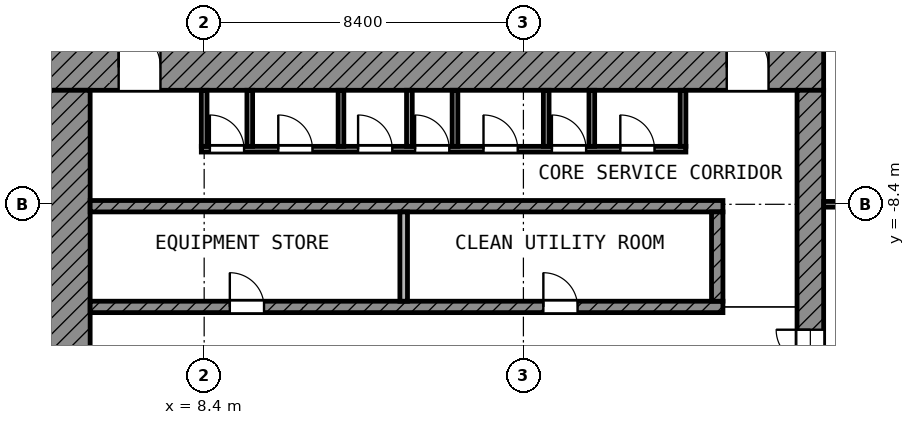
"""IFC4 building model, lengths in metres.
Left out: names, types, materials, properties, quantities, classifications, styles, units other than length and angle.
Written with IfcOpenShell. Run it as: python <this file> out.ifc"""

import sys

from ifc_helpers import new_model, si_unit, direction, frame, frame_2d, origin, place, context, subcontext, project, spatial, rectangle, extrude, element, fill, save


model = new_model("IFC4")
c1 = context("Model", 3, precision=1e-05, world=origin(), true_north=direction((0.0, 1.0)))
c2 = subcontext(c1, "Body", "Model", "MODEL_VIEW")
j1 = project(units=[si_unit("LENGTHUNIT", "METRE"), si_unit("PLANEANGLEUNIT", "RADIAN")], contexts=[c1])
p1 = place(None, origin())
s1 = spatial("IfcSite", under=j1, at=p1, CompositionType="ELEMENT")
p2 = place(p1, origin())
s2 = spatial("IfcBuilding", under=s1, at=p2, CompositionType="ELEMENT")
p3 = place(p2, frame((0.0, 0.0, 302.8)))
s3 = spatial("IfcBuildingStorey", under=s2, at=p3, CompositionType="ELEMENT", Elevation=302.8)
p4 = place(p3, frame((4.2, -4.8, 0.0), z_axis=(0.0, 0.0, 1.0), x_axis=(1.0, 0.0, 0.0)))
e1 = element("IfcWall", 1, at=p4, inside=s3, PredefinedType="SHEAR", context=c2, shape_type="SweptSolid", body=[
    extrude(rectangle(XDim=20.5, YDim=1.2, at=frame_2d((10.25, 0.0))), origin(), (0.0, 0.0, 1.0), 3.6),
])
p5 = place(p4, frame((1.95, 0.0, 0.0)))
e2 = element("IfcOpeningElement", 2, at=p5, cuts=e1, PredefinedType="OPENING", context=c2, shape_type="SweptSolid", body=[
    extrude(rectangle(XDim=1.1, YDim=2.1, at=frame_2d((0.55, 1.05))), frame((0.0, 0.61, 0.0), z_axis=(0.0, -1.0, 0.0), x_axis=(1.0, 0.0, 0.0)), (0.0, 0.0, 1.0), 1.22),
])
p6 = place(p4, frame((17.95, 0.0, 0.0)))
e3 = element("IfcOpeningElement", 3, at=p6, cuts=e1, PredefinedType="OPENING", context=c2, shape_type="SweptSolid", body=[
    extrude(rectangle(XDim=1.1, YDim=2.1, at=frame_2d((0.55, 1.05))), frame((0.0, 0.61, 0.0), z_axis=(0.0, -1.0, 0.0), x_axis=(1.0, 0.0, 0.0)), (0.0, 0.0, 1.0), 1.22),
])
p7 = place(p3, frame((4.8, -24.7, 0.0), z_axis=(0.0, 0.0, 1.0), x_axis=(0.0, 1.0, 0.0)))
e4 = element("IfcWall", 4, at=p7, inside=s3, PredefinedType="SHEAR", context=c2, shape_type="SweptSolid", body=[
    extrude(rectangle(XDim=19.3, YDim=1.2, at=frame_2d((9.65, 0.0))), origin(), (0.0, 0.0, 1.0), 3.6),
])
p8 = place(p7, frame((11.15, 0.0, 0.0)))
e5 = element("IfcOpeningElement", 5, at=p8, cuts=e4, PredefinedType="OPENING", context=c2, shape_type="SweptSolid", body=[
    extrude(rectangle(XDim=1.1, YDim=2.1, at=frame_2d((0.55, 1.05))), frame((0.0, 0.61, 0.0), z_axis=(0.0, -1.0, 0.0), x_axis=(1.0, 0.0, 0.0)), (0.0, 0.0, 1.0), 1.22),
])
p9 = place(p7, frame((1.85, 0.0, 0.0)))
e6 = element("IfcOpeningElement", 6, at=p9, cuts=e4, PredefinedType="OPENING", context=c2, shape_type="SweptSolid", body=[
    extrude(rectangle(XDim=1.1, YDim=2.1, at=frame_2d((0.55, 1.05))), frame((0.0, 0.61, 0.0), z_axis=(0.0, -1.0, 0.0), x_axis=(1.0, 0.0, 0.0)), (0.0, 0.0, 1.0), 1.22),
])
p10 = place(p3, frame((24.35, -24.0, 0.0), z_axis=(0.0, 0.0, 1.0), x_axis=(0.0, 1.0, 0.0)))
e7 = element("IfcWall", 7, at=p10, inside=s3, PredefinedType="SHEAR", context=c2, shape_type="SweptSolid", body=[
    extrude(rectangle(XDim=18.6, YDim=0.7, at=frame_2d((9.3, 0.0))), origin(), (0.0, 0.0, 1.0), 3.6),
])
p11 = place(p10, frame((10.5, 0.0, 0.0)))
e8 = element("IfcOpeningElement", 8, at=p11, cuts=e7, PredefinedType="OPENING", context=c2, shape_type="SweptSolid", body=[
    extrude(rectangle(XDim=1.8, YDim=2.1, at=frame_2d((0.9, 1.05))), frame((0.0, 0.36, 0.0), z_axis=(0.0, -1.0, 0.0), x_axis=(1.0, 0.0, 0.0)), (0.0, 0.0, 1.0), 0.72),
])
p12 = place(p3, frame((5.4, -8.45, 0.0), z_axis=(0.0, 0.0, 1.0), x_axis=(1.0, 0.0, 0.0)))
e9 = element("IfcWall", 9, at=p12, inside=s3, PredefinedType="SHEAR", context=c2, shape_type="SweptSolid", body=[
    extrude(rectangle(XDim=16.65, YDim=0.3, at=frame_2d((8.325, 0.0))), origin(), (0.0, 0.0, 1.0), 3.6),
])
p13 = place(p3, frame((5.4, -11.1, 0.0), z_axis=(0.0, 0.0, 1.0), x_axis=(1.0, 0.0, 0.0)))
e10 = element("IfcWall", 10, at=p13, inside=s3, PredefinedType="SHEAR", context=c2, shape_type="SweptSolid", body=[
    extrude(rectangle(XDim=16.65, YDim=0.3, at=frame_2d((8.325, 0.0))), origin(), (0.0, 0.0, 1.0), 3.6),
])
p14 = place(p13, frame((3.675, 0.0, 0.0)))
e11 = element("IfcOpeningElement", 11, at=p14, cuts=e10, PredefinedType="OPENING", context=c2, shape_type="SweptSolid", body=[
    extrude(rectangle(XDim=0.9, YDim=2.1, at=frame_2d((0.45, 1.05))), frame((0.0, 0.16, 0.0), z_axis=(0.0, -1.0, 0.0), x_axis=(1.0, 0.0, 0.0)), (0.0, 0.0, 1.0), 0.32),
])
p15 = place(p13, frame((11.925, 0.0, 0.0)))
e12 = element("IfcOpeningElement", 12, at=p15, cuts=e10, PredefinedType="OPENING", context=c2, shape_type="SweptSolid", body=[
    extrude(rectangle(XDim=0.9, YDim=2.1, at=frame_2d((0.45, 1.05))), frame((0.0, 0.16, 0.0), z_axis=(0.0, -1.0, 0.0), x_axis=(1.0, 0.0, 0.0)), (0.0, 0.0, 1.0), 0.32),
])
p16 = place(p3, frame((21.9, -10.95, 0.0), z_axis=(0.0, 0.0, 1.0), x_axis=(0.0, 1.0, 0.0)))
e13 = element("IfcWall", 13, at=p16, inside=s3, PredefinedType="SHEAR", context=c2, shape_type="SweptSolid", body=[
    extrude(rectangle(XDim=2.35, YDim=0.3, at=frame_2d((1.175, 0.0))), origin(), (0.0, 0.0, 1.0), 3.6),
])
p17 = place(p3, frame((13.65, -10.95, 0.0), z_axis=(0.0, 0.0, 1.0), x_axis=(0.0, 1.0, 0.0)))
e14 = element("IfcWall", 14, at=p17, inside=s3, PredefinedType="PARTITIONING", context=c2, shape_type="SweptSolid", body=[
    extrude(rectangle(XDim=2.35, YDim=0.2, at=frame_2d((1.175, 0.0))), origin(), (0.0, 0.0, 1.0), 3.6),
])
p18 = place(p3, frame((8.325, -6.95, 0.0), z_axis=(0.0, 0.0, 1.0), x_axis=(1.0, 0.0, 0.0)))
e15 = element("IfcWall", 15, at=p18, inside=s3, PredefinedType="PARTITIONING", context=c2, shape_type="SweptSolid", body=[
    extrude(rectangle(XDim=12.75, YDim=0.15, at=frame_2d((6.375, 0.0))), origin(), (0.0, 0.0, 1.0), 3.6),
])
p19 = place(p18, frame((0.225, 0.0, 0.0)))
e16 = element("IfcOpeningElement", 16, at=p19, cuts=e15, PredefinedType="OPENING", context=c2, shape_type="SweptSolid", body=[
    extrude(rectangle(XDim=0.9, YDim=2.1, at=frame_2d((0.45, 1.05))), frame((0.0, 0.085, 0.0), z_axis=(0.0, -1.0, 0.0), x_axis=(1.0, 0.0, 0.0)), (0.0, 0.0, 1.0), 0.17),
])
p20 = place(p18, frame((2.025, 0.0, 0.0)))
e17 = element("IfcOpeningElement", 17, at=p20, cuts=e15, PredefinedType="OPENING", context=c2, shape_type="SweptSolid", body=[
    extrude(rectangle(XDim=0.9, YDim=2.1, at=frame_2d((0.45, 1.05))), frame((0.0, 0.085, 0.0), z_axis=(0.0, -1.0, 0.0), x_axis=(1.0, 0.0, 0.0)), (0.0, 0.0, 1.0), 0.17),
])
p21 = place(p18, frame((4.125, 0.0, 0.0)))
e18 = element("IfcOpeningElement", 18, at=p21, cuts=e15, PredefinedType="OPENING", context=c2, shape_type="SweptSolid", body=[
    extrude(rectangle(XDim=0.9, YDim=2.1, at=frame_2d((0.45, 1.05))), frame((0.0, 0.085, 0.0), z_axis=(0.0, -1.0, 0.0), x_axis=(1.0, 0.0, 0.0)), (0.0, 0.0, 1.0), 0.17),
])
p22 = place(p18, frame((5.625, 0.0, 0.0)))
e19 = element("IfcOpeningElement", 19, at=p22, cuts=e15, PredefinedType="OPENING", context=c2, shape_type="SweptSolid", body=[
    extrude(rectangle(XDim=0.9, YDim=2.1, at=frame_2d((0.45, 1.05))), frame((0.0, 0.085, 0.0), z_axis=(0.0, -1.0, 0.0), x_axis=(1.0, 0.0, 0.0)), (0.0, 0.0, 1.0), 0.17),
])
p23 = place(p18, frame((7.425, 0.0, 0.0)))
e20 = element("IfcOpeningElement", 20, at=p23, cuts=e15, PredefinedType="OPENING", context=c2, shape_type="SweptSolid", body=[
    extrude(rectangle(XDim=0.9, YDim=2.1, at=frame_2d((0.45, 1.05))), frame((0.0, 0.085, 0.0), z_axis=(0.0, -1.0, 0.0), x_axis=(1.0, 0.0, 0.0)), (0.0, 0.0, 1.0), 0.17),
])
p24 = place(p18, frame((9.225, 0.0, 0.0)))
e21 = element("IfcOpeningElement", 21, at=p24, cuts=e15, PredefinedType="OPENING", context=c2, shape_type="SweptSolid", body=[
    extrude(rectangle(XDim=0.9, YDim=2.1, at=frame_2d((0.45, 1.05))), frame((0.0, 0.085, 0.0), z_axis=(0.0, -1.0, 0.0), x_axis=(1.0, 0.0, 0.0)), (0.0, 0.0, 1.0), 0.17),
])
p25 = place(p18, frame((11.025, 0.0, 0.0)))
e22 = element("IfcOpeningElement", 22, at=p25, cuts=e15, PredefinedType="OPENING", context=c2, shape_type="SweptSolid", body=[
    extrude(rectangle(XDim=0.9, YDim=2.1, at=frame_2d((0.45, 1.05))), frame((0.0, 0.085, 0.0), z_axis=(0.0, -1.0, 0.0), x_axis=(1.0, 0.0, 0.0)), (0.0, 0.0, 1.0), 0.17),
])
for number, where, z_axis, x_axis in (
    (23, (8.4, -6.875, 0.0), (0.0, 0.0, 1.0), (0.0, 1.0, 0.0)),
    (24, (9.6, -6.875, 0.0), (0.0, 0.0, 1.0), (0.0, 1.0, 0.0)),
    (25, (12.0, -6.875, 0.0), (0.0, 0.0, 1.0), (0.0, 1.0, 0.0)),
    (26, (13.8, -6.875, 0.0), (0.0, 0.0, 1.0), (0.0, 1.0, 0.0)),
    (27, (15.0, -6.875, 0.0), (0.0, 0.0, 1.0), (0.0, 1.0, 0.0)),
    (28, (17.4, -6.875, 0.0), (0.0, 0.0, 1.0), (0.0, 1.0, 0.0)),
    (29, (18.6, -6.875, 0.0), (0.0, 0.0, 1.0), (0.0, 1.0, 0.0)),
    (30, (21.0, -6.875, 0.0), (0.0, 0.0, 1.0), (0.0, 1.0, 0.0)),
):
    element("IfcWall", number, at=place(p3, frame(where, z_axis=z_axis, x_axis=x_axis)), inside=s3, PredefinedType="PARTITIONING", context=c2, shape_type="SweptSolid", body=[
        extrude(rectangle(XDim=1.475, YDim=0.15, at=frame_2d((0.738, 0.0))), origin(), (0.0, 0.0, 1.0), 3.6),
    ])
p26 = place(p3, frame((24.7, -8.4, 0.0), z_axis=(0.0, 0.0, 1.0), x_axis=(1.0, 0.0, 0.0)))
e31 = element("IfcWall", 31, at=p26, inside=s3, PredefinedType="PARTITIONING", context=c2, shape_type="SweptSolid", body=[
    extrude(rectangle(XDim=15.582, YDim=0.15, at=frame_2d((7.791, 0.0))), origin(), (0.0, 0.0, 1.0), 3.6),
])
p27 = place(p26, frame((9.35, 0.0, 0.0)))
e32 = element("IfcOpeningElement", 32, at=p27, cuts=e31, PredefinedType="OPENING", context=c2, shape_type="SweptSolid", body=[
    extrude(rectangle(XDim=1.1, YDim=2.1, at=frame_2d((0.55, 1.05))), frame((0.0, 0.085, 0.0), z_axis=(0.0, -1.0, 0.0), x_axis=(1.0, 0.0, 0.0)), (0.0, 0.0, 1.0), 0.17),
])
p28 = place(p26, frame((1.05, 0.0, 0.0)))
e33 = element("IfcOpeningElement", 33, at=p28, cuts=e31, PredefinedType="OPENING", context=c2, shape_type="SweptSolid", body=[
    extrude(rectangle(XDim=1.0, YDim=2.1, at=frame_2d((0.5, 1.05))), frame((0.0, 0.085, 0.0), z_axis=(0.0, -1.0, 0.0), x_axis=(1.0, 0.0, 0.0)), (0.0, 0.0, 1.0), 0.17),
])
p29 = place(p26, frame((5.15, 0.0, 0.0)))
e34 = element("IfcOpeningElement", 34, at=p29, cuts=e31, PredefinedType="OPENING", context=c2, shape_type="SweptSolid", body=[
    extrude(rectangle(XDim=1.2, YDim=2.1, at=frame_2d((0.6, 1.05))), frame((0.0, 0.085, 0.0), z_axis=(0.0, -1.0, 0.0), x_axis=(1.0, 0.0, 0.0)), (0.0, 0.0, 1.0), 0.17),
])
p30 = place(p5, origin())
e35 = element("IfcDoor", 35, at=p30, inside=s3, OperationType="SINGLE_SWING_LEFT", PredefinedType="DOOR", context=c2, shape_type="SweptSolid", body=[
    extrude(rectangle(XDim=1.1, YDim=2.1, at=frame_2d((0.55, 1.05))), frame((0.0, 0.025, 0.0), z_axis=(0.0, -1.0, 0.0), x_axis=(1.0, 0.0, 0.0)), (0.0, 0.0, 1.0), 0.05),
])
fill(e2, e35)
p31 = place(p6, origin())
e36 = element("IfcDoor", 36, at=p31, inside=s3, OperationType="SINGLE_SWING_LEFT", PredefinedType="DOOR", context=c2, shape_type="SweptSolid", body=[
    extrude(rectangle(XDim=1.1, YDim=2.1, at=frame_2d((0.55, 1.05))), frame((0.0, 0.025, 0.0), z_axis=(0.0, -1.0, 0.0), x_axis=(1.0, 0.0, 0.0)), (0.0, 0.0, 1.0), 0.05),
])
fill(e3, e36)
p32 = place(p11, origin())
e37 = element("IfcDoor", 37, at=p32, inside=s3, OperationType="DOUBLE_DOOR_SINGLE_SWING", PredefinedType="DOOR", context=c2, shape_type="SweptSolid", body=[
    extrude(rectangle(XDim=1.8, YDim=2.1, at=frame_2d((0.9, 1.05))), frame((0.0, 0.025, 0.0), z_axis=(0.0, -1.0, 0.0), x_axis=(1.0, 0.0, 0.0)), (0.0, 0.0, 1.0), 0.05),
])
fill(e8, e37)
p33 = place(p19, origin())
e38 = element("IfcDoor", 38, at=p33, inside=s3, OperationType="SINGLE_SWING_LEFT", PredefinedType="DOOR", context=c2, shape_type="SweptSolid", body=[
    extrude(rectangle(XDim=0.9, YDim=2.1, at=frame_2d((0.45, 1.05))), frame((0.0, 0.025, 0.0), z_axis=(0.0, -1.0, 0.0), x_axis=(1.0, 0.0, 0.0)), (0.0, 0.0, 1.0), 0.05),
])
fill(e16, e38)
p34 = place(p20, origin())
e39 = element("IfcDoor", 39, at=p34, inside=s3, OperationType="SINGLE_SWING_LEFT", PredefinedType="DOOR", context=c2, shape_type="SweptSolid", body=[
    extrude(rectangle(XDim=0.9, YDim=2.1, at=frame_2d((0.45, 1.05))), frame((0.0, 0.025, 0.0), z_axis=(0.0, -1.0, 0.0), x_axis=(1.0, 0.0, 0.0)), (0.0, 0.0, 1.0), 0.05),
])
fill(e17, e39)
p35 = place(p21, origin())
e40 = element("IfcDoor", 40, at=p35, inside=s3, OperationType="SINGLE_SWING_LEFT", PredefinedType="DOOR", context=c2, shape_type="SweptSolid", body=[
    extrude(rectangle(XDim=0.9, YDim=2.1, at=frame_2d((0.45, 1.05))), frame((0.0, 0.025, 0.0), z_axis=(0.0, -1.0, 0.0), x_axis=(1.0, 0.0, 0.0)), (0.0, 0.0, 1.0), 0.05),
])
fill(e18, e40)
p36 = place(p22, origin())
e41 = element("IfcDoor", 41, at=p36, inside=s3, OperationType="SINGLE_SWING_LEFT", PredefinedType="DOOR", context=c2, shape_type="SweptSolid", body=[
    extrude(rectangle(XDim=0.9, YDim=2.1, at=frame_2d((0.45, 1.05))), frame((0.0, 0.025, 0.0), z_axis=(0.0, -1.0, 0.0), x_axis=(1.0, 0.0, 0.0)), (0.0, 0.0, 1.0), 0.05),
])
fill(e19, e41)
p37 = place(p23, origin())
e42 = element("IfcDoor", 42, at=p37, inside=s3, OperationType="SINGLE_SWING_LEFT", PredefinedType="DOOR", context=c2, shape_type="SweptSolid", body=[
    extrude(rectangle(XDim=0.9, YDim=2.1, at=frame_2d((0.45, 1.05))), frame((0.0, 0.025, 0.0), z_axis=(0.0, -1.0, 0.0), x_axis=(1.0, 0.0, 0.0)), (0.0, 0.0, 1.0), 0.05),
])
fill(e20, e42)
p38 = place(p24, origin())
e43 = element("IfcDoor", 43, at=p38, inside=s3, OperationType="SINGLE_SWING_LEFT", PredefinedType="DOOR", context=c2, shape_type="SweptSolid", body=[
    extrude(rectangle(XDim=0.9, YDim=2.1, at=frame_2d((0.45, 1.05))), frame((0.0, 0.025, 0.0), z_axis=(0.0, -1.0, 0.0), x_axis=(1.0, 0.0, 0.0)), (0.0, 0.0, 1.0), 0.05),
])
fill(e21, e43)
p39 = place(p25, origin())
e44 = element("IfcDoor", 44, at=p39, inside=s3, OperationType="SINGLE_SWING_LEFT", PredefinedType="DOOR", context=c2, shape_type="SweptSolid", body=[
    extrude(rectangle(XDim=0.9, YDim=2.1, at=frame_2d((0.45, 1.05))), frame((0.0, 0.025, 0.0), z_axis=(0.0, -1.0, 0.0), x_axis=(1.0, 0.0, 0.0)), (0.0, 0.0, 1.0), 0.05),
])
fill(e22, e44)
p40 = place(p14, origin())
e45 = element("IfcDoor", 45, at=p40, inside=s3, OperationType="SINGLE_SWING_LEFT", PredefinedType="DOOR", context=c2, shape_type="SweptSolid", body=[
    extrude(rectangle(XDim=0.9, YDim=2.1, at=frame_2d((0.45, 1.05))), frame((0.0, 0.025, 0.0), z_axis=(0.0, -1.0, 0.0), x_axis=(1.0, 0.0, 0.0)), (0.0, 0.0, 1.0), 0.05),
])
fill(e11, e45)
p41 = place(p15, origin())
e46 = element("IfcDoor", 46, at=p41, inside=s3, OperationType="SINGLE_SWING_LEFT", PredefinedType="DOOR", context=c2, shape_type="SweptSolid", body=[
    extrude(rectangle(XDim=0.9, YDim=2.1, at=frame_2d((0.45, 1.05))), frame((0.0, 0.025, 0.0), z_axis=(0.0, -1.0, 0.0), x_axis=(1.0, 0.0, 0.0)), (0.0, 0.0, 1.0), 0.05),
])
fill(e12, e46)
save(model, sys.argv[1])
